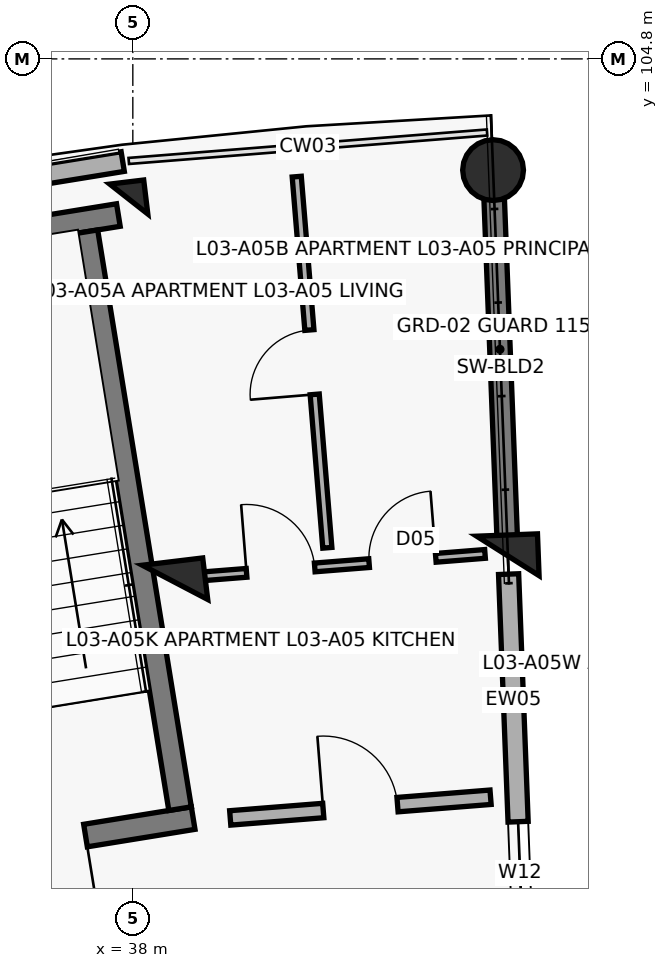
"""IFC4 building model, lengths in metres.
Left out: names, types, materials, properties, quantities, classifications, styles, units other than length and angle.
Written with IfcOpenShell. Run it as: python <this file> out.ifc"""

import sys

from ifc_helpers import new_model, si_unit, direction, frame, frame_2d, origin, origin_2d, place, context, subcontext, project, spatial, rectangle, circle, extrude, element, fill, save


model = new_model("IFC4")
c1 = context("Model", 3, precision=1e-05, world=origin(), true_north=direction((0.0, 1.0)))
c2 = subcontext(c1, "Body", "Model", "MODEL_VIEW")
j1 = project(units=[si_unit("LENGTHUNIT", "METRE"), si_unit("PLANEANGLEUNIT", "RADIAN")], contexts=[c1])
p1 = place(None, origin())
s1 = spatial("IfcSite", under=j1, at=p1, CompositionType="ELEMENT")
p2 = place(p1, origin())
s2 = spatial("IfcBuilding", under=s1, at=p2, CompositionType="ELEMENT")
p3 = place(p2, frame((0.0, 0.0, 11.2)))
s3 = spatial("IfcBuildingStorey", under=s2, at=p3, CompositionType="ELEMENT", Elevation=11.2)
p4 = place(p3, frame((38.555, 97.913, 0.0), z_axis=(0.0, 0.0, 1.0), x_axis=(-0.119790293837, 0.992799217114, 0.0)))
e1 = element("IfcColumn", 1, at=p4, inside=s3, PredefinedType="COLUMN", context=c2, shape_type="SweptSolid", body=[
    extrude(rectangle(XDim=0.55, YDim=0.8, at=origin_2d()), origin(), (0.0, 0.0, 1.0), 3.1),
])
p5 = place(p3, frame((37.947, 102.956, 0.0), z_axis=(0.0, 0.0, 1.0), x_axis=(-0.119790293837, 0.992799217114, 0.0)))
e2 = element("IfcColumn", 2, at=p5, inside=s3, PredefinedType="COLUMN", context=c2, shape_type="SweptSolid", body=[
    extrude(rectangle(XDim=0.45, YDim=0.45, at=origin_2d()), origin(), (0.0, 0.0, 1.0), 3.1),
])
p6 = place(p3, frame((42.935, 98.26, 0.0), z_axis=(0.0, 0.0, 1.0), x_axis=(-0.038387809088, 0.999262916411, 0.0)))
e3 = element("IfcColumn", 3, at=p6, inside=s3, PredefinedType="COLUMN", context=c2, shape_type="SweptSolid", body=[
    extrude(rectangle(XDim=0.55, YDim=0.8, at=origin_2d()), origin(), (0.0, 0.0, 1.0), 3.1),
])
p7 = place(p3, frame((42.74, 103.337, 0.0), z_axis=(0.0, 0.0, 1.0), x_axis=(-0.038387809088, 0.999262916411, 0.0)))
e4 = element("IfcColumn", 4, at=p7, inside=s3, PredefinedType="COLUMN", context=c2, shape_type="SweptSolid", body=[
    extrude(circle(Radius=0.4, at=origin_2d()), origin(), (0.0, 0.0, 1.0), 3.1),
])
p8 = place(p3, frame((42.928, 98.44, 0.0), z_axis=(0.0, 0.0, 1.0), x_axis=(-0.038379487611, 0.999263236055, 0.0)))
e5 = element("IfcWall", 5, at=p8, inside=s3, PredefinedType="SHEAR", context=c2, shape_type="SweptSolid", body=[
    extrude(rectangle(XDim=4.72, YDim=0.27, at=frame_2d((2.36, 0.0))), origin(), (0.0, 0.0, 1.0), 2.86),
])
p9 = place(p3, frame((33.12, 102.679, 0.0), z_axis=(0.0, 0.0, 1.0), x_axis=(0.987080750493, 0.160223568819, 0.0)))
e6 = element("IfcWall", 6, at=p9, inside=s3, PredefinedType="SOLIDWALL", context=c2, shape_type="SweptSolid", body=[
    extrude(rectangle(XDim=4.809, YDim=0.262, at=frame_2d((2.404, 0.0))), origin(), (0.0, 0.0, 1.0), 2.25),
])
p10 = place(p3, frame((43.259, 89.827, 0.0), z_axis=(0.0, 0.0, 1.0), x_axis=(-0.038407966241, 0.999262141847, 0.0)))
e7 = element("IfcWall", 7, at=p10, inside=s3, PredefinedType="SOLIDWALL", context=c2, shape_type="SweptSolid", body=[
    extrude(rectangle(XDim=8.2, YDim=0.265, at=frame_2d((4.1, 0.0))), origin(), (0.0, 0.0, 1.0), 2.08),
])
p11 = place(p10, frame((3.59, 0.0, 0.75)))
e8 = element("IfcOpeningElement", 8, at=p11, cuts=e7, PredefinedType="OPENING", context=c2, shape_type="SweptSolid", body=[
    extrude(rectangle(XDim=1.35, YDim=1.35, at=frame_2d((0.675, 0.675))), frame((0.0, 0.142, 0.0), z_axis=(0.0, -1.0, 0.0), x_axis=(1.0, 0.0, 0.0)), (0.0, 0.0, 1.0), 0.285),
])
p12 = place(p3, frame((38.794, 94.811, 0.0), z_axis=(0.0, 0.0, 1.0), x_axis=(-0.987077443397, -0.160243941341, 0.0)))
e9 = element("IfcWall", 9, at=p12, inside=s3, PredefinedType="SHEAR", context=c2, shape_type="SweptSolid", body=[
    extrude(rectangle(XDim=3.87, YDim=0.3, at=frame_2d((1.935, 0.0))), origin(), (0.0, 0.0, 1.0), 3.1),
])
p13 = place(p12, frame((1.435, 0.0, 0.0)))
e10 = element("IfcOpeningElement", 10, at=p13, cuts=e9, PredefinedType="OPENING", context=c2, shape_type="SweptSolid", body=[
    extrude(rectangle(XDim=1.0, YDim=2.15, at=frame_2d((0.5, 1.075))), frame((0.0, 0.16, 0.0), z_axis=(0.0, -1.0, 0.0), x_axis=(1.0, 0.0, 0.0)), (0.0, 0.0, 1.0), 0.32),
])
p14 = place(p3, frame((37.81, 102.745, 0.0), z_axis=(0.0, 0.0, 1.0), x_axis=(-0.987084710126, -0.160199173019, 0.0)))
e11 = element("IfcWall", 11, at=p14, inside=s3, PredefinedType="SHEAR", context=c2, shape_type="SweptSolid", body=[
    extrude(rectangle(XDim=4.47, YDim=0.3, at=frame_2d((2.235, 0.0))), origin(), (0.0, 0.0, 1.0), 3.1),
])
p15 = place(p3, frame((38.622, 94.935, 0.0), z_axis=(0.0, 0.0, 1.0), x_axis=(-0.160196564502, 0.987085133472, 0.0)))
e12 = element("IfcWall", 12, at=p15, inside=s3, PredefinedType="SHEAR", context=c2, shape_type="SweptSolid", body=[
    extrude(rectangle(XDim=7.69, YDim=0.3, at=frame_2d((3.845, 0.0))), origin(), (0.0, 0.0, 1.0), 3.1),
])
p16 = place(p3, frame((39.281, 94.813, 0.0), z_axis=(0.0, 0.0, 1.0), x_axis=(0.996862545573, 0.079152165058, 0.0)))
e13 = element("IfcWall", 13, at=p16, inside=s3, PredefinedType="SOLIDWALL", context=c2, shape_type="SweptSolid", body=[
    extrude(rectangle(XDim=3.436, YDim=0.19, at=frame_2d((1.718, 0.0))), origin(), (0.0, 0.0, 1.0), 2.08),
])
p17 = place(p16, frame((1.228, 0.0, 0.0)))
e14 = element("IfcOpeningElement", 14, at=p17, cuts=e13, PredefinedType="OPENING", context=c2, shape_type="SweptSolid", body=[
    extrude(rectangle(XDim=0.98, YDim=2.15, at=frame_2d((0.49, 1.075))), frame((0.0, 0.105, 0.0), z_axis=(0.0, -1.0, 0.0), x_axis=(1.0, 0.0, 0.0)), (0.0, 0.0, 1.0), 0.21),
])
p18 = place(p3, frame((38.848, 97.986, 0.0), z_axis=(0.0, 0.0, 1.0), x_axis=(0.996863138536, 0.079144696778, 0.0)))
e15 = element("IfcWall", 15, at=p18, inside=s3, PredefinedType="PARTITIONING", context=c2, shape_type="SweptSolid", body=[
    extrude(rectangle(XDim=3.797, YDim=0.115, at=frame_2d((1.899, 0.0))), origin(), (0.0, 0.0, 1.0), 2.08),
])
p19 = place(p18, frame((0.65, 0.0, 0.0)))
e16 = element("IfcOpeningElement", 16, at=p19, cuts=e15, PredefinedType="OPENING", context=c2, shape_type="SweptSolid", body=[
    extrude(rectangle(XDim=0.9, YDim=2.1, at=frame_2d((0.45, 1.05))), frame((0.0, 0.067, 0.0), z_axis=(0.0, -1.0, 0.0), x_axis=(1.0, 0.0, 0.0)), (0.0, 0.0, 1.0), 0.135),
])
p20 = place(p18, frame((2.267, 0.0, 0.0)))
e17 = element("IfcOpeningElement", 17, at=p20, cuts=e15, PredefinedType="OPENING", context=c2, shape_type="SweptSolid", body=[
    extrude(rectangle(XDim=0.88, YDim=2.1, at=frame_2d((0.44, 1.05))), frame((0.0, 0.067, 0.0), z_axis=(0.0, -1.0, 0.0), x_axis=(1.0, 0.0, 0.0)), (0.0, 0.0, 1.0), 0.135),
])
p21 = place(p3, frame((40.559, 98.367, 0.0), z_axis=(0.0, 0.0, 1.0), x_axis=(-0.082158932509, 0.996619240136, 0.0)))
e18 = element("IfcWall", 18, at=p21, inside=s3, PredefinedType="PARTITIONING", context=c2, shape_type="SweptSolid", body=[
    extrude(rectangle(XDim=4.9, YDim=0.12, at=frame_2d((2.45, 0.0))), origin(), (0.0, 0.0, 1.0), 2.08),
])
p22 = place(p21, frame((2.025, 0.0, 0.0)))
e19 = element("IfcOpeningElement", 19, at=p22, cuts=e18, PredefinedType="OPENING", context=c2, shape_type="SweptSolid", body=[
    extrude(rectangle(XDim=0.85, YDim=2.1, at=frame_2d((0.425, 1.05))), frame((0.0, 0.07, 0.0), z_axis=(0.0, -1.0, 0.0), x_axis=(1.0, 0.0, 0.0)), (0.0, 0.0, 1.0), 0.14),
])
p23 = place(p11, origin())
e20 = element("IfcWindow", 20, at=p23, inside=s3, PartitioningType="DOUBLE_PANEL_VERTICAL", PredefinedType="WINDOW", context=c2, shape_type="SweptSolid", body=[
    extrude(rectangle(XDim=1.35, YDim=1.35, at=frame_2d((0.675, 0.675))), frame((0.0, 0.03, 0.0), z_axis=(0.0, -1.0, 0.0), x_axis=(1.0, 0.0, 0.0)), (0.0, 0.0, 1.0), 0.06),
])
fill(e8, e20)
p24 = place(p13, origin())
e21 = element("IfcDoor", 21, at=p24, inside=s3, OperationType="SINGLE_SWING_LEFT", PredefinedType="DOOR", context=c2, shape_type="SweptSolid", body=[
    extrude(rectangle(XDim=1.0, YDim=2.15, at=frame_2d((0.5, 1.075))), frame((0.0, 0.025, 0.0), z_axis=(0.0, -1.0, 0.0), x_axis=(1.0, 0.0, 0.0)), (0.0, 0.0, 1.0), 0.05),
])
fill(e10, e21)
p25 = place(p17, origin())
e22 = element("IfcDoor", 22, at=p25, inside=s3, OperationType="SINGLE_SWING_LEFT", PredefinedType="DOOR", context=c2, shape_type="SweptSolid", body=[
    extrude(rectangle(XDim=0.98, YDim=2.15, at=frame_2d((0.49, 1.075))), frame((0.0, 0.025, 0.0), z_axis=(0.0, -1.0, 0.0), x_axis=(1.0, 0.0, 0.0)), (0.0, 0.0, 1.0), 0.05),
])
fill(e14, e22)
p26 = place(p19, origin())
e23 = element("IfcDoor", 23, at=p26, inside=s3, OperationType="SINGLE_SWING_LEFT", PredefinedType="DOOR", context=c2, shape_type="SweptSolid", body=[
    extrude(rectangle(XDim=0.9, YDim=2.1, at=frame_2d((0.45, 1.05))), frame((0.0, 0.025, 0.0), z_axis=(0.0, -1.0, 0.0), x_axis=(1.0, 0.0, 0.0)), (0.0, 0.0, 1.0), 0.05),
])
fill(e16, e23)
p27 = place(p20, origin())
e24 = element("IfcDoor", 24, at=p27, inside=s3, OperationType="SINGLE_SWING_RIGHT", PredefinedType="DOOR", context=c2, shape_type="SweptSolid", body=[
    extrude(rectangle(XDim=0.88, YDim=2.1, at=frame_2d((0.44, 1.05))), frame((0.0, 0.025, 0.0), z_axis=(0.0, -1.0, 0.0), x_axis=(1.0, 0.0, 0.0)), (0.0, 0.0, 1.0), 0.05),
])
fill(e17, e24)
p28 = place(p22, origin())
e25 = element("IfcDoor", 25, at=p28, inside=s3, OperationType="SINGLE_SWING_LEFT", PredefinedType="DOOR", context=c2, shape_type="SweptSolid", body=[
    extrude(rectangle(XDim=0.85, YDim=2.1, at=frame_2d((0.425, 1.05))), frame((0.0, 0.025, 0.0), z_axis=(0.0, -1.0, 0.0), x_axis=(1.0, 0.0, 0.0)), (0.0, 0.0, 1.0), 0.05),
])
fill(e19, e25)
save(model, sys.argv[1])
